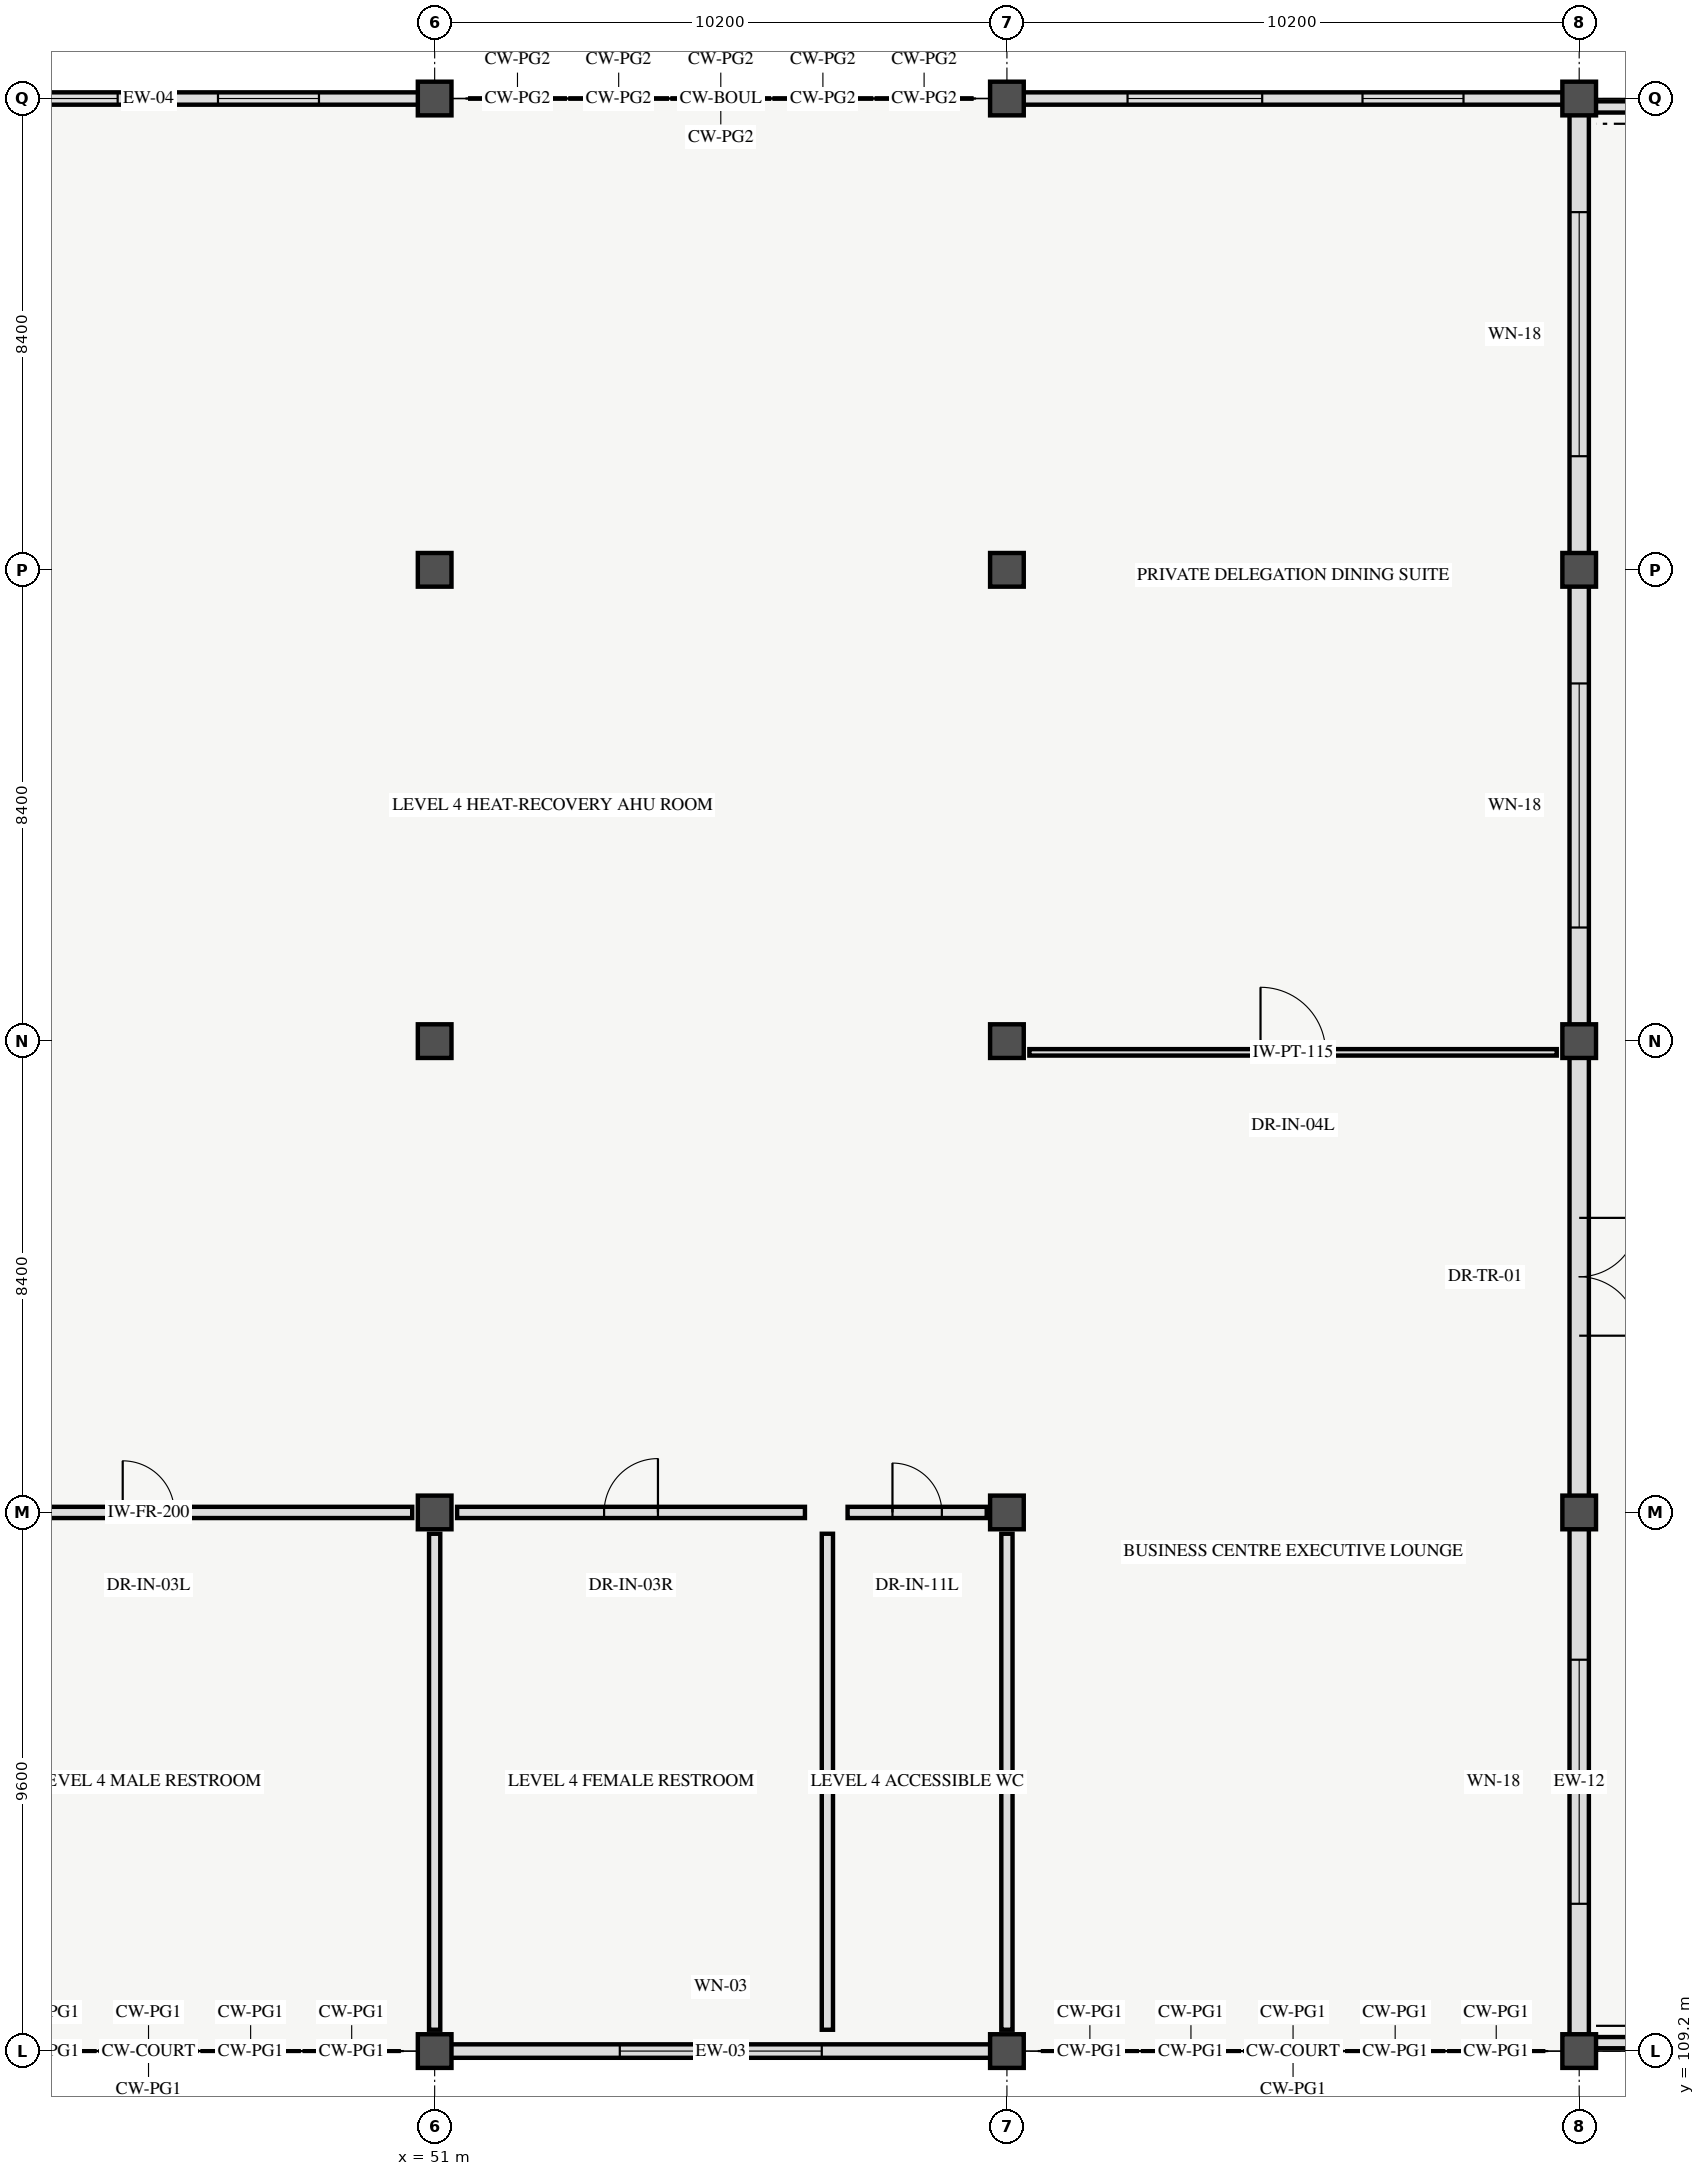
"""IFC4 building model, lengths in metres.
Left out: names, types, materials, properties, quantities, classifications, styles, units other than length and angle.
Written with IfcOpenShell. Run it as: python <this file> out.ifc"""

import sys

from ifc_helpers import new_model, si_unit, direction, frame, frame_2d, origin, origin_2d, place, context, subcontext, project, spatial, rectangle, extrude, element, fill, save


model = new_model("IFC4")
c1 = context("Model", 3, precision=1e-05, world=origin(), true_north=direction((0.0, 1.0)))
c2 = subcontext(c1, "Body", "Model", "MODEL_VIEW")
j1 = project(units=[si_unit("LENGTHUNIT", "METRE"), si_unit("PLANEANGLEUNIT", "RADIAN")], contexts=[c1])
p1 = place(None, origin())
s1 = spatial("IfcSite", under=j1, at=p1, CompositionType="ELEMENT")
p2 = place(p1, origin())
s2 = spatial("IfcBuilding", under=s1, at=p2, CompositionType="ELEMENT")
p3 = place(p2, frame((0.0, 0.0, 19.2)))
s3 = spatial("IfcBuildingStorey", under=s2, at=p3, CompositionType="ELEMENT", Elevation=19.2)
for number, where, z_axis, x_axis in (
    (1, (51.0, 109.2, 0.0), (0.0, 0.0, 1.0), (1.0, 0.0, 0.0)),
    (2, (51.0, 118.8, 0.0), (0.0, 0.0, 1.0), (1.0, 0.0, 0.0)),
    (3, (51.0, 127.2, 0.0), (0.0, 0.0, 1.0), (1.0, 0.0, 0.0)),
    (4, (51.0, 135.6, 0.0), (0.0, 0.0, 1.0), (1.0, 0.0, 0.0)),
    (5, (51.0, 144.0, 0.0), (0.0, 0.0, 1.0), (1.0, 0.0, 0.0)),
    (6, (61.2, 109.2, 0.0), (0.0, 0.0, 1.0), (1.0, 0.0, 0.0)),
    (7, (61.2, 118.8, 0.0), (0.0, 0.0, 1.0), (1.0, 0.0, 0.0)),
    (8, (61.2, 127.2, 0.0), (0.0, 0.0, 1.0), (1.0, 0.0, 0.0)),
    (9, (61.2, 135.6, 0.0), (0.0, 0.0, 1.0), (1.0, 0.0, 0.0)),
    (10, (61.2, 144.0, 0.0), (0.0, 0.0, 1.0), (1.0, 0.0, 0.0)),
    (11, (71.4, 109.2, 0.0), (0.0, 0.0, 1.0), (1.0, 0.0, 0.0)),
    (12, (71.4, 118.8, 0.0), (0.0, 0.0, 1.0), (1.0, 0.0, 0.0)),
    (13, (71.4, 127.2, 0.0), (0.0, 0.0, 1.0), (1.0, 0.0, 0.0)),
    (14, (71.4, 135.6, 0.0), (0.0, 0.0, 1.0), (1.0, 0.0, 0.0)),
    (15, (71.4, 144.0, 0.0), (0.0, 0.0, 1.0), (1.0, 0.0, 0.0)),
):
    element("IfcColumn", number, at=place(p3, frame(where, z_axis=z_axis, x_axis=x_axis)), inside=s3, PredefinedType="COLUMN", context=c2, shape_type="SweptSolid", body=[
        extrude(rectangle(XDim=0.6, YDim=0.6, at=origin_2d()), origin(), (0.0, 0.0, 1.0), 4.2),
    ])
p4 = place(p3, frame((41.04, 144.0, 0.0), z_axis=(0.0, 0.0, 1.0), x_axis=(1.0, 0.0, 0.0)))
e16 = element("IfcWall", 16, at=p4, inside=s3, PredefinedType="STANDARD", context=c2, shape_type="SweptSolid", body=[
    extrude(rectangle(XDim=9.72, YDim=0.22, at=frame_2d((4.86, 0.0))), origin(), (0.0, 0.0, 1.0), 3.06),
])
p5 = place(p4, frame((1.91, 0.0, 0.7)))
e17 = element("IfcOpeningElement", 17, at=p5, cuts=e16, PredefinedType="OPENING", context=c2, shape_type="SweptSolid", body=[
    extrude(rectangle(XDim=2.4, YDim=2.1, at=frame_2d((1.2, 1.05))), frame((0.0, 0.12, 0.0), z_axis=(0.0, -1.0, 0.0), x_axis=(1.0, 0.0, 0.0)), (0.0, 0.0, 1.0), 0.24),
])
p6 = place(p4, frame((6.098, 0.0, 0.85)))
e18 = element("IfcOpeningElement", 18, at=p6, cuts=e16, PredefinedType="OPENING", context=c2, shape_type="SweptSolid", body=[
    extrude(rectangle(XDim=1.8, YDim=1.8, at=frame_2d((0.9, 0.9))), frame((0.0, 0.12, 0.0), z_axis=(0.0, -1.0, 0.0), x_axis=(1.0, 0.0, 0.0)), (0.0, 0.0, 1.0), 0.24),
])
p7 = place(p3, frame((51.24, 109.2, 0.0), z_axis=(0.0, 0.0, 1.0), x_axis=(1.0, 0.0, 0.0)))
e19 = element("IfcWall", 19, at=p7, inside=s3, PredefinedType="STANDARD", context=c2, shape_type="SweptSolid", body=[
    extrude(rectangle(XDim=9.72, YDim=0.24, at=frame_2d((4.86, 0.0))), origin(), (0.0, 0.0, 1.0), 3.06),
])
p8 = place(p7, frame((3.06, 0.0, 0.9)))
e20 = element("IfcOpeningElement", 20, at=p8, cuts=e19, PredefinedType="OPENING", context=c2, shape_type="SweptSolid", body=[
    extrude(rectangle(XDim=3.6, YDim=2.1, at=frame_2d((1.8, 1.05))), frame((0.0, 0.13, 0.0), z_axis=(0.0, -1.0, 0.0), x_axis=(1.0, 0.0, 0.0)), (0.0, 0.0, 1.0), 0.26),
])
p9 = place(p3, frame((61.44, 144.0, 0.0), z_axis=(0.0, 0.0, 1.0), x_axis=(1.0, 0.0, 0.0)))
e21 = element("IfcWall", 21, at=p9, inside=s3, PredefinedType="STANDARD", context=c2, shape_type="SweptSolid", body=[
    extrude(rectangle(XDim=9.72, YDim=0.22, at=frame_2d((4.86, 0.0))), origin(), (0.0, 0.0, 1.0), 3.06),
])
p10 = place(p9, frame((1.91, 0.0, 0.7)))
e22 = element("IfcOpeningElement", 22, at=p10, cuts=e21, PredefinedType="OPENING", context=c2, shape_type="SweptSolid", body=[
    extrude(rectangle(XDim=2.4, YDim=2.1, at=frame_2d((1.2, 1.05))), frame((0.0, 0.12, 0.0), z_axis=(0.0, -1.0, 0.0), x_axis=(1.0, 0.0, 0.0)), (0.0, 0.0, 1.0), 0.24),
])
p11 = place(p9, frame((6.098, 0.0, 0.85)))
e23 = element("IfcOpeningElement", 23, at=p11, cuts=e21, PredefinedType="OPENING", context=c2, shape_type="SweptSolid", body=[
    extrude(rectangle(XDim=1.8, YDim=1.8, at=frame_2d((0.9, 0.9))), frame((0.0, 0.12, 0.0), z_axis=(0.0, -1.0, 0.0), x_axis=(1.0, 0.0, 0.0)), (0.0, 0.0, 1.0), 0.24),
])
p12 = place(p3, frame((71.4, 109.44, 0.0), z_axis=(0.0, 0.0, 1.0), x_axis=(0.0, 1.0, 0.0)))
e24 = element("IfcWall", 24, at=p12, inside=s3, PredefinedType="STANDARD", context=c2, shape_type="SweptSolid", body=[
    extrude(rectangle(XDim=9.12, YDim=0.345, at=frame_2d((4.56, 0.0))), origin(), (0.0, 0.0, 1.0), 3.06),
])
p13 = place(p12, frame((2.385, 0.0, 0.9)))
e25 = element("IfcOpeningElement", 25, at=p13, cuts=e24, PredefinedType="OPENING", context=c2, shape_type="SweptSolid", body=[
    extrude(rectangle(XDim=4.35, YDim=1.68, at=frame_2d((2.175, 0.84))), frame((0.0, 0.182, 0.0), z_axis=(0.0, -1.0, 0.0), x_axis=(1.0, 0.0, 0.0)), (0.0, 0.0, 1.0), 0.365),
])
p14 = place(p3, frame((71.4, 119.04, 0.0), z_axis=(0.0, 0.0, 1.0), x_axis=(0.0, 1.0, 0.0)))
e26 = element("IfcWall", 26, at=p14, inside=s3, PredefinedType="STANDARD", context=c2, shape_type="SweptSolid", body=[
    extrude(rectangle(XDim=7.92, YDim=0.345, at=frame_2d((3.96, 0.0))), origin(), (0.0, 0.0, 1.0), 3.06),
])
p15 = place(p14, frame((2.91, 0.0, 0.0)))
e27 = element("IfcOpeningElement", 27, at=p15, cuts=e26, PredefinedType="OPENING", context=c2, shape_type="SweptSolid", body=[
    extrude(rectangle(XDim=2.1, YDim=2.3, at=frame_2d((1.05, 1.15))), frame((0.0, 0.182, 0.0), z_axis=(0.0, -1.0, 0.0), x_axis=(1.0, 0.0, 0.0)), (0.0, 0.0, 1.0), 0.365),
])
p16 = place(p3, frame((71.4, 127.44, 0.0), z_axis=(0.0, 0.0, 1.0), x_axis=(0.0, 1.0, 0.0)))
e28 = element("IfcWall", 28, at=p16, inside=s3, PredefinedType="STANDARD", context=c2, shape_type="SweptSolid", body=[
    extrude(rectangle(XDim=7.92, YDim=0.345, at=frame_2d((3.96, 0.0))), origin(), (0.0, 0.0, 1.0), 3.06),
])
p17 = place(p16, frame((1.785, 0.0, 0.9)))
e29 = element("IfcOpeningElement", 29, at=p17, cuts=e28, PredefinedType="OPENING", context=c2, shape_type="SweptSolid", body=[
    extrude(rectangle(XDim=4.35, YDim=1.68, at=frame_2d((2.175, 0.84))), frame((0.0, 0.182, 0.0), z_axis=(0.0, -1.0, 0.0), x_axis=(1.0, 0.0, 0.0)), (0.0, 0.0, 1.0), 0.365),
])
p18 = place(p3, frame((71.4, 135.84, 0.0), z_axis=(0.0, 0.0, 1.0), x_axis=(0.0, 1.0, 0.0)))
e30 = element("IfcWall", 30, at=p18, inside=s3, PredefinedType="STANDARD", context=c2, shape_type="SweptSolid", body=[
    extrude(rectangle(XDim=7.92, YDim=0.345, at=frame_2d((3.96, 0.0))), origin(), (0.0, 0.0, 1.0), 3.06),
])
p19 = place(p18, frame((1.785, 0.0, 0.9)))
e31 = element("IfcOpeningElement", 31, at=p19, cuts=e30, PredefinedType="OPENING", context=c2, shape_type="SweptSolid", body=[
    extrude(rectangle(XDim=4.35, YDim=1.68, at=frame_2d((2.175, 0.84))), frame((0.0, 0.182, 0.0), z_axis=(0.0, -1.0, 0.0), x_axis=(1.0, 0.0, 0.0)), (0.0, 0.0, 1.0), 0.365),
])
for number, where, z_axis, x_axis in (
    (32, (71.55, 109.35, 0.0), (0.0, 0.0, 1.0), (1.0, 0.0, 0.0)),
    (33, (101.85, 143.85, 0.0), (0.0, 0.0, 1.0), (-1.0, 0.0, 0.0)),
):
    element("IfcWall", number, at=place(p3, frame(where, z_axis=z_axis, x_axis=x_axis)), inside=s3, PredefinedType="PARAPET", context=c2, shape_type="SweptSolid", body=[
        extrude(rectangle(XDim=30.3, YDim=0.2, at=frame_2d((15.15, 0.0))), origin(), (0.0, 0.0, 1.0), 1.1),
    ])
p20 = place(p3, frame((41.2, 118.8, 0.0), z_axis=(0.0, 0.0, 1.0), x_axis=(1.0, 0.0, 0.0)))
e34 = element("IfcWall", 34, at=p20, inside=s3, PredefinedType="PARTITIONING", context=c2, shape_type="SweptSolid", body=[
    extrude(rectangle(XDim=9.4, YDim=0.2, at=frame_2d((4.7, 0.0))), origin(), (0.0, 0.0, 1.0), 3.06),
])
p21 = place(p20, frame((4.24, 0.0, 0.0)))
e35 = element("IfcOpeningElement", 35, at=p21, cuts=e34, PredefinedType="OPENING", context=c2, shape_type="SweptSolid", body=[
    extrude(rectangle(XDim=0.92, YDim=2.1, at=frame_2d((0.46, 1.05))), frame((0.0, 0.11, 0.0), z_axis=(0.0, -1.0, 0.0), x_axis=(1.0, 0.0, 0.0)), (0.0, 0.0, 1.0), 0.22),
])
p22 = place(p3, frame((51.4, 118.8, 0.0), z_axis=(0.0, 0.0, 1.0), x_axis=(1.0, 0.0, 0.0)))
e36 = element("IfcWall", 36, at=p22, inside=s3, PredefinedType="PARTITIONING", context=c2, shape_type="SweptSolid", body=[
    extrude(rectangle(XDim=6.2, YDim=0.2, at=frame_2d((3.1, 0.0))), origin(), (0.0, 0.0, 1.0), 3.06),
])
p23 = place(p22, frame((2.62, 0.0, 0.0)))
e37 = element("IfcOpeningElement", 37, at=p23, cuts=e36, PredefinedType="OPENING", context=c2, shape_type="SweptSolid", body=[
    extrude(rectangle(XDim=0.96, YDim=2.1, at=frame_2d((0.48, 1.05))), frame((0.0, 0.11, 0.0), z_axis=(0.0, -1.0, 0.0), x_axis=(1.0, 0.0, 0.0)), (0.0, 0.0, 1.0), 0.22),
])
p24 = place(p3, frame((61.6, 127.0, 0.0), z_axis=(0.0, 0.0, 1.0), x_axis=(1.0, 0.0, 0.0)))
e38 = element("IfcWall", 38, at=p24, inside=s3, PredefinedType="PARTITIONING", context=c2, shape_type="SweptSolid", body=[
    extrude(rectangle(XDim=9.4, YDim=0.115, at=frame_2d((4.7, 0.0))), origin(), (0.0, 0.0, 1.0), 3.06),
])
p25 = place(p24, frame((4.12, 0.0, 0.0)))
e39 = element("IfcOpeningElement", 39, at=p25, cuts=e38, PredefinedType="OPENING", context=c2, shape_type="SweptSolid", body=[
    extrude(rectangle(XDim=1.16, YDim=2.2, at=frame_2d((0.58, 1.1))), frame((0.0, 0.067, 0.0), z_axis=(0.0, -1.0, 0.0), x_axis=(1.0, 0.0, 0.0)), (0.0, 0.0, 1.0), 0.135),
])
p26 = place(p3, frame((58.36, 118.8, 0.0), z_axis=(0.0, 0.0, 1.0), x_axis=(1.0, 0.0, 0.0)))
e40 = element("IfcWall", 40, at=p26, inside=s3, PredefinedType="PARTITIONING", context=c2, shape_type="SweptSolid", body=[
    extrude(rectangle(XDim=2.48, YDim=0.2, at=frame_2d((1.24, 0.0))), origin(), (0.0, 0.0, 1.0), 3.06),
])
p27 = place(p26, frame((0.8, 0.0, 0.0)))
e41 = element("IfcOpeningElement", 41, at=p27, cuts=e40, PredefinedType="OPENING", context=c2, shape_type="SweptSolid", body=[
    extrude(rectangle(XDim=0.88, YDim=2.08, at=frame_2d((0.44, 1.04))), frame((0.0, 0.11, 0.0), z_axis=(0.0, -1.0, 0.0), x_axis=(1.0, 0.0, 0.0)), (0.0, 0.0, 1.0), 0.22),
])
for number, where, z_axis, x_axis in (
    (42, (51.0, 109.58, 0.0), (0.0, 0.0, 1.0), (0.0, 1.0, 0.0)),
    (43, (58.0, 109.58, 0.0), (0.0, 0.0, 1.0), (0.0, 1.0, 0.0)),
    (44, (61.2, 109.58, 0.0), (0.0, 0.0, 1.0), (0.0, 1.0, 0.0)),
):
    element("IfcWall", number, at=place(p3, frame(where, z_axis=z_axis, x_axis=x_axis)), inside=s3, PredefinedType="PARTITIONING", context=c2, shape_type="SweptSolid", body=[
        extrude(rectangle(XDim=8.84, YDim=0.2, at=frame_2d((4.42, 0.0))), origin(), (0.0, 0.0, 1.0), 3.06),
    ])
p28 = place(p5, origin())
e45 = element("IfcWindow", 45, at=p28, inside=s3, PartitioningType="DOUBLE_PANEL_VERTICAL", PredefinedType="WINDOW", context=c2, shape_type="SweptSolid", body=[
    extrude(rectangle(XDim=2.4, YDim=2.1, at=frame_2d((1.2, 1.05))), frame((0.0, 0.03, 0.0), z_axis=(0.0, -1.0, 0.0), x_axis=(1.0, 0.0, 0.0)), (0.0, 0.0, 1.0), 0.06),
])
fill(e17, e45)
p29 = place(p6, origin())
e46 = element("IfcWindow", 46, at=p29, inside=s3, PartitioningType="DOUBLE_PANEL_VERTICAL", PredefinedType="WINDOW", context=c2, shape_type="SweptSolid", body=[
    extrude(rectangle(XDim=1.8, YDim=1.8, at=frame_2d((0.9, 0.9))), frame((0.0, 0.03, 0.0), z_axis=(0.0, -1.0, 0.0), x_axis=(1.0, 0.0, 0.0)), (0.0, 0.0, 1.0), 0.06),
])
fill(e18, e46)
p30 = place(p8, origin())
e47 = element("IfcWindow", 47, at=p30, inside=s3, PartitioningType="TRIPLE_PANEL_VERTICAL", PredefinedType="WINDOW", context=c2, shape_type="SweptSolid", body=[
    extrude(rectangle(XDim=3.6, YDim=2.1, at=frame_2d((1.8, 1.05))), frame((0.0, 0.03, 0.0), z_axis=(0.0, -1.0, 0.0), x_axis=(1.0, 0.0, 0.0)), (0.0, 0.0, 1.0), 0.06),
])
fill(e20, e47)
p31 = place(p10, origin())
e48 = element("IfcWindow", 48, at=p31, inside=s3, PartitioningType="DOUBLE_PANEL_VERTICAL", PredefinedType="WINDOW", context=c2, shape_type="SweptSolid", body=[
    extrude(rectangle(XDim=2.4, YDim=2.1, at=frame_2d((1.2, 1.05))), frame((0.0, 0.03, 0.0), z_axis=(0.0, -1.0, 0.0), x_axis=(1.0, 0.0, 0.0)), (0.0, 0.0, 1.0), 0.06),
])
fill(e22, e48)
p32 = place(p11, origin())
e49 = element("IfcWindow", 49, at=p32, inside=s3, PartitioningType="DOUBLE_PANEL_VERTICAL", PredefinedType="WINDOW", context=c2, shape_type="SweptSolid", body=[
    extrude(rectangle(XDim=1.8, YDim=1.8, at=frame_2d((0.9, 0.9))), frame((0.0, 0.03, 0.0), z_axis=(0.0, -1.0, 0.0), x_axis=(1.0, 0.0, 0.0)), (0.0, 0.0, 1.0), 0.06),
])
fill(e23, e49)
p33 = place(p13, origin())
e50 = element("IfcWindow", 50, at=p33, inside=s3, PartitioningType="TRIPLE_PANEL_VERTICAL", PredefinedType="WINDOW", context=c2, shape_type="SweptSolid", body=[
    extrude(rectangle(XDim=4.35, YDim=1.68, at=frame_2d((2.175, 0.84))), frame((0.0, 0.03, 0.0), z_axis=(0.0, -1.0, 0.0), x_axis=(1.0, 0.0, 0.0)), (0.0, 0.0, 1.0), 0.06),
])
fill(e25, e50)
p34 = place(p15, frame((2.1, 0.0, 0.0), z_axis=(0.0, 0.0, 1.0), x_axis=(-1.0, 0.0, 0.0)))
e51 = element("IfcDoor", 51, at=p34, inside=s3, OperationType="DOUBLE_DOOR_SINGLE_SWING", PredefinedType="DOOR", context=c2, shape_type="SweptSolid", body=[
    extrude(rectangle(XDim=2.1, YDim=2.3, at=frame_2d((1.05, 1.15))), frame((0.0, 0.025, 0.0), z_axis=(0.0, -1.0, 0.0), x_axis=(1.0, 0.0, 0.0)), (0.0, 0.0, 1.0), 0.05),
])
fill(e27, e51)
p35 = place(p17, origin())
e52 = element("IfcWindow", 52, at=p35, inside=s3, PartitioningType="TRIPLE_PANEL_VERTICAL", PredefinedType="WINDOW", context=c2, shape_type="SweptSolid", body=[
    extrude(rectangle(XDim=4.35, YDim=1.68, at=frame_2d((2.175, 0.84))), frame((0.0, 0.03, 0.0), z_axis=(0.0, -1.0, 0.0), x_axis=(1.0, 0.0, 0.0)), (0.0, 0.0, 1.0), 0.06),
])
fill(e29, e52)
p36 = place(p19, origin())
e53 = element("IfcWindow", 53, at=p36, inside=s3, PartitioningType="TRIPLE_PANEL_VERTICAL", PredefinedType="WINDOW", context=c2, shape_type="SweptSolid", body=[
    extrude(rectangle(XDim=4.35, YDim=1.68, at=frame_2d((2.175, 0.84))), frame((0.0, 0.03, 0.0), z_axis=(0.0, -1.0, 0.0), x_axis=(1.0, 0.0, 0.0)), (0.0, 0.0, 1.0), 0.06),
])
fill(e31, e53)
p37 = place(p21, origin())
e54 = element("IfcDoor", 54, at=p37, inside=s3, OperationType="SINGLE_SWING_LEFT", PredefinedType="DOOR", context=c2, shape_type="SweptSolid", body=[
    extrude(rectangle(XDim=0.92, YDim=2.1, at=frame_2d((0.46, 1.05))), frame((0.0, 0.025, 0.0), z_axis=(0.0, -1.0, 0.0), x_axis=(1.0, 0.0, 0.0)), (0.0, 0.0, 1.0), 0.05),
])
fill(e35, e54)
p38 = place(p23, origin())
e55 = element("IfcDoor", 55, at=p38, inside=s3, OperationType="SINGLE_SWING_RIGHT", PredefinedType="DOOR", context=c2, shape_type="SweptSolid", body=[
    extrude(rectangle(XDim=0.96, YDim=2.1, at=frame_2d((0.48, 1.05))), frame((0.0, 0.025, 0.0), z_axis=(0.0, -1.0, 0.0), x_axis=(1.0, 0.0, 0.0)), (0.0, 0.0, 1.0), 0.05),
])
fill(e37, e55)
p39 = place(p25, origin())
e56 = element("IfcDoor", 56, at=p39, inside=s3, OperationType="SINGLE_SWING_LEFT", PredefinedType="DOOR", context=c2, shape_type="SweptSolid", body=[
    extrude(rectangle(XDim=1.16, YDim=2.2, at=frame_2d((0.58, 1.1))), frame((0.0, 0.025, 0.0), z_axis=(0.0, -1.0, 0.0), x_axis=(1.0, 0.0, 0.0)), (0.0, 0.0, 1.0), 0.05),
])
fill(e39, e56)
p40 = place(p27, origin())
e57 = element("IfcDoor", 57, at=p40, inside=s3, OperationType="SINGLE_SWING_LEFT", PredefinedType="DOOR", context=c2, shape_type="SweptSolid", body=[
    extrude(rectangle(XDim=0.88, YDim=2.08, at=frame_2d((0.44, 1.04))), frame((0.0, 0.025, 0.0), z_axis=(0.0, -1.0, 0.0), x_axis=(1.0, 0.0, 0.0)), (0.0, 0.0, 1.0), 0.05),
])
fill(e41, e57)
save(model, sys.argv[1])
